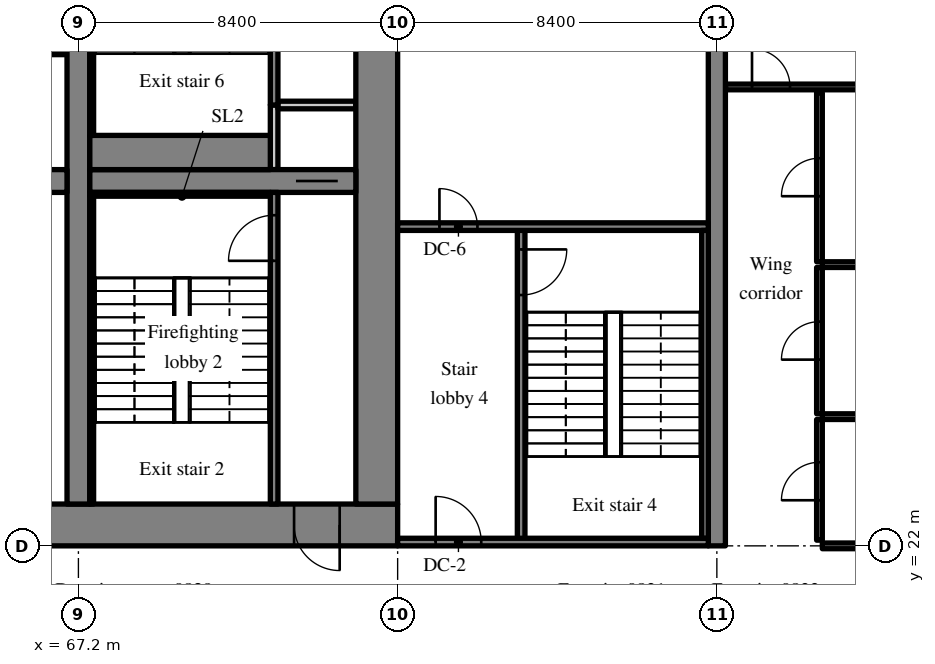
"""IFC4 building model, lengths in metres.
Left out: names, types, materials, properties, quantities, classifications, styles, units other than length and angle.
Written with IfcOpenShell. Run it as: python <this file> out.ifc"""

import sys

from ifc_helpers import new_model, si_unit, direction, frame, frame_2d, origin, place, context, subcontext, project, spatial, rectangle, extrude, source, transform, mapped, element, fill, save


model = new_model("IFC4")
c1 = context("Model", 3, precision=1e-05, world=origin(), true_north=direction((0.0, 1.0)))
c2 = subcontext(c1, "Body", "Model", "MODEL_VIEW")
j1 = project(units=[si_unit("LENGTHUNIT", "METRE"), si_unit("PLANEANGLEUNIT", "RADIAN")], contexts=[c1])
p1 = place(None, origin())
s1 = spatial("IfcSite", under=j1, at=p1, CompositionType="ELEMENT")
p2 = place(p1, origin())
s2 = spatial("IfcBuilding", under=s1, at=p2, CompositionType="ELEMENT")
p3 = place(p2, frame((0.0, 0.0, 39.2)))
s3 = spatial("IfcBuildingStorey", under=s2, at=p3, CompositionType="ELEMENT", Elevation=39.2)
m1 = source(origin(), c2, "Body", "SweptSolid", [
    extrude(rectangle(XDim=50.4, YDim=1.1, at=frame_2d((25.2, 0.0))), origin(), (0.0, 0.0, 1.0), 3.52),
])
p4 = place(p3, frame((25.2, 22.55, 0.0), z_axis=(0.0, 0.0, 1.0), x_axis=(1.0, 0.0, 0.0)))
e1 = element("IfcWall", 1, at=p4, inside=s3, PredefinedType="SHEAR", context=c2, shape_type="MappedRepresentation", body=[
    mapped(m1, transform((0.0, 0.0, 0.0), scale=1.0)),
])
m2 = source(origin(), c2, "Body", "SweptSolid", [
    extrude(rectangle(XDim=1.8, YDim=2.1, at=frame_2d((0.9, 1.05))), frame((0.0, 0.56, 0.0), z_axis=(0.0, -1.0, 0.0), x_axis=(1.0, 0.0, 0.0)), (0.0, 0.0, 1.0), 1.12),
])
p5 = place(p4, frame((15.9, 0.0, 0.0)))
e2 = element("IfcOpeningElement", 2, at=p5, cuts=e1, PredefinedType="OPENING", context=c2, shape_type="MappedRepresentation", body=[
    mapped(m2, transform((0.0, 0.0, 0.0), scale=1.0)),
])
m3 = source(origin(), c2, "Body", "SweptSolid", [
    extrude(rectangle(XDim=1.2, YDim=2.1, at=frame_2d((0.6, 1.05))), frame((0.0, 0.56, 0.0), z_axis=(0.0, -1.0, 0.0), x_axis=(1.0, 0.0, 0.0)), (0.0, 0.0, 1.0), 1.12),
])
p6 = place(p4, frame((27.0, 0.0, 0.0)))
e3 = element("IfcOpeningElement", 3, at=p6, cuts=e1, PredefinedType="OPENING", context=c2, shape_type="MappedRepresentation", body=[
    mapped(m3, transform((0.0, 0.0, 0.0), scale=1.0)),
])
m4 = source(origin(), c2, "Body", "SweptSolid", [
    extrude(rectangle(XDim=0.9, YDim=2.1, at=frame_2d((0.45, 1.05))), frame((0.0, 0.56, 0.0), z_axis=(0.0, -1.0, 0.0), x_axis=(1.0, 0.0, 0.0)), (0.0, 0.0, 1.0), 1.12),
])
p7 = place(p4, frame((33.75, 0.0, 0.0)))
e4 = element("IfcOpeningElement", 4, at=p7, cuts=e1, PredefinedType="OPENING", context=c2, shape_type="MappedRepresentation", body=[
    mapped(m4, transform((0.0, 0.0, 0.0), scale=1.0)),
])
p8 = place(p4, frame((30.75, 0.0, 0.0)))
e5 = element("IfcOpeningElement", 5, at=p8, cuts=e1, PredefinedType="OPENING", context=c2, shape_type="MappedRepresentation", body=[
    mapped(m4, transform((0.0, 0.0, 0.0), scale=1.0)),
])
p9 = place(p4, frame((39.75, 0.0, 0.0)))
e6 = element("IfcOpeningElement", 6, at=p9, cuts=e1, PredefinedType="OPENING", context=c2, shape_type="MappedRepresentation", body=[
    mapped(m4, transform((0.0, 0.0, 0.0), scale=1.0)),
])
p10 = place(p4, frame((36.75, 0.0, 0.0)))
e7 = element("IfcOpeningElement", 7, at=p10, cuts=e1, PredefinedType="OPENING", context=c2, shape_type="MappedRepresentation", body=[
    mapped(m4, transform((0.0, 0.0, 0.0), scale=1.0)),
])
p11 = place(p4, frame((6.425, 0.0, 0.0)))
e8 = element("IfcOpeningElement", 8, at=p11, cuts=e1, PredefinedType="OPENING", context=c2, shape_type="MappedRepresentation", body=[
    mapped(m3, transform((0.0, 0.0, 0.0), scale=1.0)),
])
p12 = place(p4, frame((47.675, 0.0, 0.0)))
e9 = element("IfcOpeningElement", 9, at=p12, cuts=e1, PredefinedType="OPENING", context=c2, shape_type="MappedRepresentation", body=[
    mapped(m3, transform((0.0, 0.0, 0.0), scale=1.0)),
])
m5 = source(origin(), c2, "Body", "SweptSolid", [
    extrude(rectangle(XDim=17.8, YDim=1.1, at=frame_2d((8.9, 0.0))), origin(), (0.0, 0.0, 1.0), 3.52),
])
p13 = place(p3, frame((75.05, 23.1, 0.0), z_axis=(0.0, 0.0, 1.0), x_axis=(0.0, 1.0, 0.0)))
e10 = element("IfcWall", 10, at=p13, inside=s3, PredefinedType="SHEAR", context=c2, shape_type="MappedRepresentation", body=[
    mapped(m5, transform((0.0, 0.0, 0.0), scale=1.0)),
])
p14 = place(p13, frame((12.3, 0.0, 0.0)))
e11 = element("IfcOpeningElement", 11, at=p14, cuts=e10, PredefinedType="OPENING", context=c2, shape_type="MappedRepresentation", body=[
    mapped(m3, transform((0.0, 0.0, 0.0), scale=1.0)),
])
m6 = source(origin(), c2, "Body", "SweptSolid", [
    extrude(rectangle(XDim=17.8, YDim=0.6, at=frame_2d((8.9, 0.0))), origin(), (0.0, 0.0, 1.0), 3.52),
])
p15 = place(p3, frame((67.2, 23.1, 0.0), z_axis=(0.0, 0.0, 1.0), x_axis=(0.0, 1.0, 0.0)))
e12 = element("IfcWall", 12, at=p15, inside=s3, PredefinedType="SHEAR", context=c2, shape_type="MappedRepresentation", body=[
    mapped(m6, transform((0.0, 0.0, 0.0), scale=1.0)),
])
m7 = source(origin(), c2, "Body", "SweptSolid", [
    extrude(rectangle(XDim=16.2, YDim=0.6, at=frame_2d((8.1, 0.0))), origin(), (0.0, 0.0, 1.0), 3.52),
])
p16 = place(p3, frame((50.7, 31.6, 0.0), z_axis=(0.0, 0.0, 1.0), x_axis=(1.0, 0.0, 0.0)))
e13 = element("IfcWall", 13, at=p16, inside=s3, PredefinedType="SHEAR", context=c2, shape_type="MappedRepresentation", body=[
    mapped(m7, transform((0.0, 0.0, 0.0), scale=1.0)),
])
m8 = source(origin(), c2, "Body", "SweptSolid", [
    extrude(rectangle(XDim=1.0, YDim=2.1, at=frame_2d((0.5, 1.05))), frame((0.0, 0.31, 0.0), z_axis=(0.0, -1.0, 0.0), x_axis=(1.0, 0.0, 0.0)), (0.0, 0.0, 1.0), 0.62),
])
p17 = place(p16, frame((0.55, 0.0, 0.0)))
e14 = element("IfcOpeningElement", 14, at=p17, cuts=e13, PredefinedType="OPENING", context=c2, shape_type="MappedRepresentation", body=[
    mapped(m8, transform((0.0, 0.0, 0.0), scale=1.0)),
])
m9 = source(origin(), c2, "Body", "SweptSolid", [
    extrude(rectangle(XDim=7.0, YDim=0.6, at=frame_2d((3.5, 0.0))), origin(), (0.0, 0.0, 1.0), 3.52),
])
p18 = place(p3, frame((67.5, 31.6, 0.0), z_axis=(0.0, 0.0, 1.0), x_axis=(1.0, 0.0, 0.0)))
e15 = element("IfcWall", 15, at=p18, inside=s3, PredefinedType="SHEAR", context=c2, shape_type="MappedRepresentation", body=[
    mapped(m9, transform((0.0, 0.0, 0.0), scale=1.0)),
])
m10 = source(origin(), c2, "Body", "SweptSolid", [
    extrude(rectangle(XDim=1.1, YDim=2.1, at=frame_2d((0.55, 1.05))), frame((0.0, 0.31, 0.0), z_axis=(0.0, -1.0, 0.0), x_axis=(1.0, 0.0, 0.0)), (0.0, 0.0, 1.0), 0.62),
])
p19 = place(p18, frame((5.425, 0.0, 0.0)))
e16 = element("IfcOpeningElement", 16, at=p19, cuts=e15, PredefinedType="OPENING", context=c2, shape_type="MappedRepresentation", body=[
    mapped(m10, transform((0.0, 0.0, 0.0), scale=1.0)),
])
m11 = source(origin(), c2, "Body", "SweptSolid", [
    extrude(rectangle(XDim=20.0, YDim=0.45, at=frame_2d((10.0, 0.0))), origin(), (0.0, 0.0, 1.0), 3.52),
])
p20 = place(p3, frame((84.0, 22.0, 0.0), z_axis=(0.0, 0.0, 1.0), x_axis=(0.0, 1.0, 0.0)))
e17 = element("IfcWall", 17, at=p20, inside=s3, PredefinedType="SHEAR", context=c2, shape_type="MappedRepresentation", body=[
    mapped(m11, transform((0.0, 0.0, 0.0), scale=1.0)),
])
m12 = source(origin(), c2, "Body", "SweptSolid", [
    extrude(rectangle(XDim=14.1, YDim=0.15, at=frame_2d((7.05, 0.0))), origin(), (0.0, 0.0, 1.0), 3.52),
])
p21 = place(p3, frame((66.9, 35.0, 0.0), z_axis=(0.0, 0.0, 1.0), x_axis=(-1.0, 0.0, 0.0)))
e18 = element("IfcWall", 18, at=p21, inside=s3, PredefinedType="PARTITIONING", context=c2, shape_type="MappedRepresentation", body=[
    mapped(m12, transform((0.0, 0.0, 0.0), scale=1.0)),
])
m13 = source(origin(), c2, "Body", "SweptSolid", [
    extrude(rectangle(XDim=0.9, YDim=2.1, at=frame_2d((0.45, 1.05))), frame((0.0, 0.085, 0.0), z_axis=(0.0, -1.0, 0.0), x_axis=(1.0, 0.0, 0.0)), (0.0, 0.0, 1.0), 0.17),
])
p22 = place(p21, frame((2.004, 0.0, 0.0)))
e19 = element("IfcOpeningElement", 19, at=p22, cuts=e18, PredefinedType="OPENING", context=c2, shape_type="MappedRepresentation", body=[
    mapped(m13, transform((0.0, 0.0, 0.0), scale=1.0)),
])
p23 = place(p21, frame((9.017, 0.0, 0.0)))
e20 = element("IfcOpeningElement", 20, at=p23, cuts=e18, PredefinedType="OPENING", context=c2, shape_type="MappedRepresentation", body=[
    mapped(m13, transform((0.0, 0.0, 0.0), scale=1.0)),
])
m14 = source(origin(), c2, "Body", "SweptSolid", [
    extrude(rectangle(XDim=8.2, YDim=0.2, at=frame_2d((4.1, 0.0))), origin(), (0.0, 0.0, 1.0), 3.52),
])
p24 = place(p3, frame((72.35, 23.1, 0.0), z_axis=(0.0, 0.0, 1.0), x_axis=(0.0, 1.0, 0.0)))
e21 = element("IfcWall", 21, at=p24, inside=s3, PredefinedType="SOLIDWALL", context=c2, shape_type="MappedRepresentation", body=[
    mapped(m14, transform((0.0, 0.0, 0.0), scale=1.0)),
])
m15 = source(origin(), c2, "Body", "SweptSolid", [
    extrude(rectangle(XDim=1.2, YDim=2.1, at=frame_2d((0.6, 1.05))), frame((0.0, 0.11, 0.0), z_axis=(0.0, -1.0, 0.0), x_axis=(1.0, 0.0, 0.0)), (0.0, 0.0, 1.0), 0.22),
])
p25 = place(p24, frame((6.4, 0.0, 0.0)))
e22 = element("IfcOpeningElement", 22, at=p25, cuts=e21, PredefinedType="OPENING", context=c2, shape_type="MappedRepresentation", body=[
    mapped(m15, transform((0.0, 0.0, 0.0), scale=1.0)),
])
m16 = source(origin(), c2, "Body", "SweptSolid", [
    extrude(rectangle(XDim=1.7, YDim=0.2, at=frame_2d((0.85, 0.0))), origin(), (0.0, 0.0, 1.0), 3.52),
])
p26 = place(p3, frame((72.35, 31.9, 0.0), z_axis=(0.0, 0.0, 1.0), x_axis=(0.0, 1.0, 0.0)))
e23 = element("IfcWall", 23, at=p26, inside=s3, PredefinedType="SOLIDWALL", context=c2, shape_type="MappedRepresentation", body=[
    mapped(m16, transform((0.0, 0.0, 0.0), scale=1.0)),
])
m17 = source(origin(), c2, "Body", "SweptSolid", [
    extrude(rectangle(XDim=2.05, YDim=0.2, at=frame_2d((1.025, 0.0))), origin(), (0.0, 0.0, 1.0), 3.52),
])
p27 = place(p3, frame((72.45, 33.6, 0.0), z_axis=(0.0, 0.0, 1.0), x_axis=(1.0, 0.0, 0.0)))
e24 = element("IfcWall", 24, at=p27, inside=s3, PredefinedType="SOLIDWALL", context=c2, shape_type="MappedRepresentation", body=[
    mapped(m17, transform((0.0, 0.0, 0.0), scale=1.0)),
])
m18 = source(origin(), c2, "Body", "SweptSolid", [
    extrude(rectangle(XDim=7.3, YDim=0.2, at=frame_2d((3.65, 0.0))), origin(), (0.0, 0.0, 1.0), 3.52),
])
p28 = place(p3, frame((72.35, 33.6, 0.0), z_axis=(0.0, 0.0, 1.0), x_axis=(0.0, 1.0, 0.0)))
e25 = element("IfcWall", 25, at=p28, inside=s3, PredefinedType="SOLIDWALL", context=c2, shape_type="MappedRepresentation", body=[
    mapped(m18, transform((0.0, 0.0, 0.0), scale=1.0)),
])
m19 = source(origin(), c2, "Body", "SweptSolid", [
    extrude(rectangle(XDim=1.8, YDim=2.1, at=frame_2d((0.9, 1.05))), frame((0.0, 0.11, 0.0), z_axis=(0.0, -1.0, 0.0), x_axis=(1.0, 0.0, 0.0)), (0.0, 0.0, 1.0), 0.22),
])
p29 = place(p28, frame((5.3, 0.0, 0.0)))
e26 = element("IfcOpeningElement", 26, at=p29, cuts=e25, PredefinedType="OPENING", context=c2, shape_type="MappedRepresentation", body=[
    mapped(m19, transform((0.0, 0.0, 0.0), scale=1.0)),
])
m20 = source(origin(), c2, "Body", "SweptSolid", [
    extrude(rectangle(XDim=8.3, YDim=0.2, at=frame_2d((4.15, 0.0))), origin(), (0.0, 0.0, 1.0), 3.52),
])
p30 = place(p3, frame((78.85, 22.1, 0.0), z_axis=(0.0, 0.0, 1.0), x_axis=(0.0, 1.0, 0.0)))
e27 = element("IfcWall", 27, at=p30, inside=s3, PredefinedType="SOLIDWALL", context=c2, shape_type="MappedRepresentation", body=[
    mapped(m20, transform((0.0, 0.0, 0.0), scale=1.0)),
])
p31 = place(p30, frame((6.5, 0.0, 0.0)))
e28 = element("IfcOpeningElement", 28, at=p31, cuts=e27, PredefinedType="OPENING", context=c2, shape_type="MappedRepresentation", body=[
    mapped(m15, transform((0.0, 0.0, 0.0), scale=1.0)),
])
m21 = source(origin(), c2, "Body", "SweptSolid", [
    extrude(rectangle(XDim=8.175, YDim=0.2, at=frame_2d((4.087, 0.0))), origin(), (0.0, 0.0, 1.0), 3.52),
])
p32 = place(p3, frame((83.775, 22.1, 0.0), z_axis=(0.0, 0.0, 1.0), x_axis=(-1.0, 0.0, 0.0)))
e29 = element("IfcWall", 29, at=p32, inside=s3, PredefinedType="SOLIDWALL", context=c2, shape_type="MappedRepresentation", body=[
    mapped(m21, transform((0.0, 0.0, 0.0), scale=1.0)),
])
p33 = place(p32, frame((5.975, 0.0, 0.0)))
e30 = element("IfcOpeningElement", 30, at=p33, cuts=e29, PredefinedType="OPENING", context=c2, shape_type="MappedRepresentation", body=[
    mapped(m15, transform((0.0, 0.0, 0.0), scale=1.0)),
])
p34 = place(p3, frame((83.775, 30.4, 0.0), z_axis=(0.0, 0.0, 1.0), x_axis=(-1.0, 0.0, 0.0)))
e31 = element("IfcWall", 31, at=p34, inside=s3, PredefinedType="SOLIDWALL", context=c2, shape_type="MappedRepresentation", body=[
    mapped(m21, transform((0.0, 0.0, 0.0), scale=1.0)),
])
m22 = source(origin(), c2, "Body", "SweptSolid", [
    extrude(rectangle(XDim=1.0, YDim=2.1, at=frame_2d((0.5, 1.05))), frame((0.0, 0.11, 0.0), z_axis=(0.0, -1.0, 0.0), x_axis=(1.0, 0.0, 0.0)), (0.0, 0.0, 1.0), 0.22),
])
p35 = place(p34, frame((6.075, 0.0, 0.0)))
e32 = element("IfcOpeningElement", 32, at=p35, cuts=e31, PredefinedType="OPENING", context=c2, shape_type="MappedRepresentation", body=[
    mapped(m22, transform((0.0, 0.0, 0.0), scale=1.0)),
])
m23 = source(origin(), c2, "Body", "SweptSolid", [
    extrude(rectangle(XDim=4.75, YDim=0.1, at=frame_2d((2.375, 0.0))), origin(), (0.0, 0.0, 1.0), 3.52),
])
p36 = place(p3, frame((67.5, 31.25, 0.0), z_axis=(0.0, 0.0, 1.0), x_axis=(1.0, 0.0, 0.0)))
e33 = element("IfcWall", 33, at=p36, inside=s3, PredefinedType="SOLIDWALL", context=c2, shape_type="MappedRepresentation", body=[
    mapped(m23, transform((0.0, 0.0, 0.0), scale=1.0)),
])
m24 = source(origin(), c2, "Body", "SweptSolid", [
    extrude(rectangle(XDim=8.1, YDim=0.1, at=frame_2d((4.05, 0.0))), origin(), (0.0, 0.0, 1.0), 3.52),
])
p37 = place(p3, frame((67.55, 23.1, 0.0), z_axis=(0.0, 0.0, 1.0), x_axis=(0.0, 1.0, 0.0)))
e34 = element("IfcWall", 34, at=p37, inside=s3, PredefinedType="SOLIDWALL", context=c2, shape_type="MappedRepresentation", body=[
    mapped(m24, transform((0.0, 0.0, 0.0), scale=1.0)),
])
m25 = source(origin(), c2, "Body", "SweptSolid", [
    extrude(rectangle(XDim=4.75, YDim=0.9, at=frame_2d((2.375, 0.0))), origin(), (0.0, 0.0, 1.0), 3.52),
])
p38 = place(p3, frame((67.5, 32.35, 0.0), z_axis=(0.0, 0.0, 1.0), x_axis=(1.0, 0.0, 0.0)))
e35 = element("IfcWall", 35, at=p38, inside=s3, PredefinedType="SOLIDWALL", context=c2, shape_type="MappedRepresentation", body=[
    mapped(m25, transform((0.0, 0.0, 0.0), scale=1.0)),
])
p39 = place(p3, frame((67.55, 32.8, 0.0), z_axis=(0.0, 0.0, 1.0), x_axis=(0.0, 1.0, 0.0)))
e36 = element("IfcWall", 36, at=p39, inside=s3, PredefinedType="SOLIDWALL", context=c2, shape_type="MappedRepresentation", body=[
    mapped(m24, transform((0.0, 0.0, 0.0), scale=1.0)),
])
m26 = source(origin(), c2, "Body", "SweptSolid", [
    extrude(rectangle(XDim=8.1, YDim=0.175, at=frame_2d((4.05, 0.0))), origin(), (0.0, 0.0, 1.0), 3.52),
])
p40 = place(p3, frame((83.688, 22.2, 0.0), z_axis=(0.0, 0.0, 1.0), x_axis=(0.0, 1.0, 0.0)))
e37 = element("IfcWall", 37, at=p40, inside=s3, PredefinedType="SOLIDWALL", context=c2, shape_type="MappedRepresentation", body=[
    mapped(m26, transform((0.0, 0.0, 0.0), scale=1.0)),
])
m27 = source(origin(), c2, "Body", "SweptSolid", [
    extrude(rectangle(XDim=5.4, YDim=0.15, at=frame_2d((2.7, 0.0))), origin(), (0.0, 0.0, 1.0), 2.82),
])
p41 = place(p3, frame((86.775, 22.0, 0.0), z_axis=(0.0, 0.0, 1.0), x_axis=(1.0, 0.0, 0.0)))
e38 = element("IfcWall", 38, at=p41, inside=s3, PredefinedType="PARTITIONING", context=c2, shape_type="MappedRepresentation", body=[
    mapped(m27, transform((0.0, 0.0, 0.0), scale=1.0)),
])
m28 = source(origin(), c2, "Body", "SweptSolid", [
    extrude(rectangle(XDim=3.175, YDim=0.15, at=frame_2d((1.587, 0.0))), origin(), (0.0, 0.0, 1.0), 3.52),
])
p42 = place(p3, frame((86.7, 22.15, 0.0), z_axis=(0.0, 0.0, 1.0), x_axis=(0.0, 1.0, 0.0)))
e39 = element("IfcWall", 39, at=p42, inside=s3, PredefinedType="PARTITIONING", context=c2, shape_type="MappedRepresentation", body=[
    mapped(m28, transform((0.0, 0.0, 0.0), scale=1.0)),
])
m29 = source(origin(), c2, "Body", "SweptSolid", [
    extrude(rectangle(XDim=1.0, YDim=2.1, at=frame_2d((0.5, 1.05))), frame((0.0, 0.085, 0.0), z_axis=(0.0, -1.0, 0.0), x_axis=(1.0, 0.0, 0.0)), (0.0, 0.0, 1.0), 0.17),
])
p43 = place(p42, frame((1.05, 0.0, 0.0)))
e40 = element("IfcOpeningElement", 40, at=p43, cuts=e39, PredefinedType="OPENING", context=c2, shape_type="MappedRepresentation", body=[
    mapped(m29, transform((0.0, 0.0, 0.0), scale=1.0)),
])
m30 = source(origin(), c2, "Body", "SweptSolid", [
    extrude(rectangle(XDim=5.4, YDim=0.15, at=frame_2d((2.7, 0.0))), origin(), (0.0, 0.0, 1.0), 3.52),
])
p44 = place(p3, frame((86.775, 25.4, 0.0), z_axis=(0.0, 0.0, 1.0), x_axis=(1.0, 0.0, 0.0)))
e41 = element("IfcWall", 41, at=p44, inside=s3, PredefinedType="PARTITIONING", context=c2, shape_type="MappedRepresentation", body=[
    mapped(m30, transform((0.0, 0.0, 0.0), scale=1.0)),
])
m31 = source(origin(), c2, "Body", "SweptSolid", [
    extrude(rectangle(XDim=3.85, YDim=0.15, at=frame_2d((1.925, 0.0))), origin(), (0.0, 0.0, 1.0), 3.52),
])
p45 = place(p3, frame((86.7, 25.475, 0.0), z_axis=(0.0, 0.0, 1.0), x_axis=(0.0, 1.0, 0.0)))
e42 = element("IfcWall", 42, at=p45, inside=s3, PredefinedType="PARTITIONING", context=c2, shape_type="MappedRepresentation", body=[
    mapped(m31, transform((0.0, 0.0, 0.0), scale=1.0)),
])
p46 = place(p45, frame((1.425, 0.0, 0.0)))
e43 = element("IfcOpeningElement", 43, at=p46, cuts=e42, PredefinedType="OPENING", context=c2, shape_type="MappedRepresentation", body=[
    mapped(m29, transform((0.0, 0.0, 0.0), scale=1.0)),
])
p47 = place(p3, frame((86.775, 29.4, 0.0), z_axis=(0.0, 0.0, 1.0), x_axis=(1.0, 0.0, 0.0)))
e44 = element("IfcWall", 44, at=p47, inside=s3, PredefinedType="PARTITIONING", context=c2, shape_type="MappedRepresentation", body=[
    mapped(m30, transform((0.0, 0.0, 0.0), scale=1.0)),
])
m32 = source(origin(), c2, "Body", "SweptSolid", [
    extrude(rectangle(XDim=4.45, YDim=0.15, at=frame_2d((2.225, 0.0))), origin(), (0.0, 0.0, 1.0), 3.52),
])
p48 = place(p3, frame((86.7, 29.475, 0.0), z_axis=(0.0, 0.0, 1.0), x_axis=(0.0, 1.0, 0.0)))
e45 = element("IfcWall", 45, at=p48, inside=s3, PredefinedType="PARTITIONING", context=c2, shape_type="MappedRepresentation", body=[
    mapped(m32, transform((0.0, 0.0, 0.0), scale=1.0)),
])
p49 = place(p48, frame((1.725, 0.0, 0.0)))
e46 = element("IfcOpeningElement", 46, at=p49, cuts=e45, PredefinedType="OPENING", context=c2, shape_type="MappedRepresentation", body=[
    mapped(m29, transform((0.0, 0.0, 0.0), scale=1.0)),
])
m33 = source(origin(), c2, "Body", "SweptSolid", [
    extrude(rectangle(XDim=7.95, YDim=0.15, at=frame_2d((3.975, 0.0))), origin(), (0.0, 0.0, 1.0), 3.52),
])
p50 = place(p3, frame((84.225, 34.075, 0.0), z_axis=(0.0, 0.0, 1.0), x_axis=(1.0, 0.0, 0.0)))
e47 = element("IfcWall", 47, at=p50, inside=s3, PredefinedType="PARTITIONING", context=c2, shape_type="MappedRepresentation", body=[
    mapped(m33, transform((0.0, 0.0, 0.0), scale=1.0)),
])
p51 = place(p50, frame((0.7, 0.0, 0.0)))
e48 = element("IfcOpeningElement", 48, at=p51, cuts=e47, PredefinedType="OPENING", context=c2, shape_type="MappedRepresentation", body=[
    mapped(m29, transform((0.0, 0.0, 0.0), scale=1.0)),
])
m34 = source(origin(), c2, "Body", "SweptSolid", [
    extrude(rectangle(XDim=1.2, YDim=2.1, at=frame_2d((0.6, 1.05))), frame((0.0, 0.025, 0.0), z_axis=(0.0, -1.0, 0.0), x_axis=(1.0, 0.0, 0.0)), (0.0, 0.0, 1.0), 0.05),
])
p52 = place(p25, origin())
e49 = element("IfcDoor", 49, at=p52, inside=s3, OperationType="SINGLE_SWING_LEFT", PredefinedType="DOOR", context=c2, shape_type="MappedRepresentation", body=[
    mapped(m34, transform((0.0, 0.0, 0.0), scale=1.0)),
])
fill(e22, e49)
m35 = source(origin(), c2, "Body", "SweptSolid", [
    extrude(rectangle(XDim=1.2, YDim=2.1, at=frame_2d((0.6, 1.05))), frame((0.0, 0.325, 0.0), z_axis=(0.0, -1.0, 0.0), x_axis=(1.0, 0.0, 0.0)), (0.0, 0.0, 1.0), 0.05),
])
p53 = place(p12, origin())
e50 = element("IfcDoor", 50, at=p53, inside=s3, OperationType="SINGLE_SWING_RIGHT", PredefinedType="DOOR", context=c2, shape_type="MappedRepresentation", body=[
    mapped(m35, transform((0.0, 0.0, 0.0), scale=1.0)),
])
fill(e9, e50)
m36 = source(origin(), c2, "Body", "SweptSolid", [
    extrude(rectangle(XDim=1.1, YDim=2.1, at=frame_2d((0.55, 1.05))), frame((0.0, 0.025, 0.0), z_axis=(0.0, -1.0, 0.0), x_axis=(1.0, 0.0, 0.0)), (0.0, 0.0, 1.0), 0.05),
])
p54 = place(p19, origin())
e51 = element("IfcDoor", 51, at=p54, inside=s3, OperationType="SLIDING_TO_RIGHT", PredefinedType="DOOR", context=c2, shape_type="MappedRepresentation", body=[
    mapped(m36, transform((0.0, 0.0, 0.0), scale=1.0)),
])
fill(e16, e51)
p55 = place(p31, origin())
e52 = element("IfcDoor", 52, at=p55, inside=s3, OperationType="SINGLE_SWING_RIGHT", PredefinedType="DOOR", context=c2, shape_type="MappedRepresentation", body=[
    mapped(m34, transform((0.0, 0.0, 0.0), scale=1.0)),
])
fill(e28, e52)
p56 = place(p33, origin())
e53 = element("IfcDoor", 53, at=p56, inside=s3, OperationType="SINGLE_SWING_RIGHT", PredefinedType="DOOR", context=c2, shape_type="MappedRepresentation", body=[
    mapped(m34, transform((0.0, 0.0, 0.0), scale=1.0)),
])
fill(e30, e53)
m37 = source(origin(), c2, "Body", "SweptSolid", [
    extrude(rectangle(XDim=1.0, YDim=2.1, at=frame_2d((0.5, 1.05))), frame((0.0, 0.025, 0.0), z_axis=(0.0, -1.0, 0.0), x_axis=(1.0, 0.0, 0.0)), (0.0, 0.0, 1.0), 0.05),
])
p57 = place(p35, origin())
e54 = element("IfcDoor", 54, at=p57, inside=s3, OperationType="SINGLE_SWING_RIGHT", PredefinedType="DOOR", context=c2, shape_type="MappedRepresentation", body=[
    mapped(m37, transform((0.0, 0.0, 0.0), scale=1.0)),
])
fill(e32, e54)
p58 = place(p43, origin())
e55 = element("IfcDoor", 55, at=p58, inside=s3, OperationType="SINGLE_SWING_LEFT", PredefinedType="DOOR", context=c2, shape_type="MappedRepresentation", body=[
    mapped(m37, transform((0.0, 0.0, 0.0), scale=1.0)),
])
fill(e40, e55)
p59 = place(p46, origin())
e56 = element("IfcDoor", 56, at=p59, inside=s3, OperationType="SINGLE_SWING_LEFT", PredefinedType="DOOR", context=c2, shape_type="MappedRepresentation", body=[
    mapped(m37, transform((0.0, 0.0, 0.0), scale=1.0)),
])
fill(e43, e56)
p60 = place(p49, origin())
e57 = element("IfcDoor", 57, at=p60, inside=s3, OperationType="SINGLE_SWING_LEFT", PredefinedType="DOOR", context=c2, shape_type="MappedRepresentation", body=[
    mapped(m37, transform((0.0, 0.0, 0.0), scale=1.0)),
])
fill(e46, e57)
p61 = place(p51, origin())
e58 = element("IfcDoor", 58, at=p61, inside=s3, OperationType="SINGLE_SWING_LEFT", PredefinedType="DOOR", context=c2, shape_type="MappedRepresentation", body=[
    mapped(m37, transform((0.0, 0.0, 0.0), scale=1.0)),
])
fill(e48, e58)
save(model, sys.argv[1])
